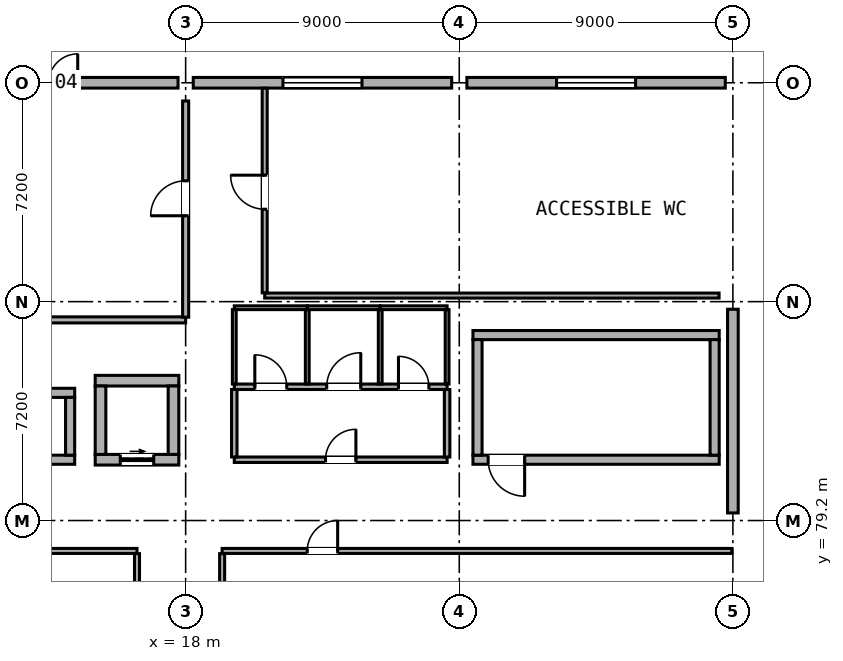
"""IFC4 building model, lengths in metres.
Left out: names, types, materials, properties, quantities, classifications, styles, units other than length and angle.
Written with IfcOpenShell. Run it as: python <this file> out.ifc"""

import sys

from ifc_helpers import new_model, si_unit, direction, frame, frame_2d, origin, origin_2d, place, context, subcontext, project, spatial, rectangle, hollow_rectangle, extrude, element, fill, save


model = new_model("IFC4")
c1 = context("Model", 3, precision=1e-05, world=origin(), true_north=direction((0.0, 1.0)))
c2 = subcontext(c1, "Body", "Model", "MODEL_VIEW")
j1 = project(units=[si_unit("LENGTHUNIT", "METRE"), si_unit("PLANEANGLEUNIT", "RADIAN")], contexts=[c1])
p1 = place(None, origin())
s1 = spatial("IfcSite", under=j1, at=p1, CompositionType="ELEMENT")
p2 = place(p1, origin())
s2 = spatial("IfcBuilding", under=s1, at=p2, CompositionType="ELEMENT")
p3 = place(p2, origin())
s3 = spatial("IfcBuildingStorey", under=s2, at=p3, CompositionType="ELEMENT", Elevation=0.0)
for number, where, z_axis, x_axis in (
    (1, (18.0, 79.2, 0.0), (0.0, 0.0, 1.0), (1.0, 0.0, 0.0)),
    (2, (18.0, 86.4, 0.0), (0.0, 0.0, 1.0), (1.0, 0.0, 0.0)),
):
    element("IfcColumn", number, at=place(p3, frame(where, z_axis=z_axis, x_axis=x_axis)), inside=s3, PredefinedType="COLUMN", context=c2, shape_type="SweptSolid", body=[
        extrude(hollow_rectangle(XDim=0.65, YDim=0.65, WallThickness=0.025, at=origin_2d()), origin(), (0.0, 0.0, 1.0), 4.8),
    ])
p4 = place(p3, frame((18.0, 93.6, 0.0), z_axis=(0.0, 0.0, 1.0), x_axis=(1.0, 0.0, 0.0)))
e3 = element("IfcColumn", 3, at=p4, inside=s3, PredefinedType="COLUMN", context=c2, shape_type="SweptSolid", body=[
    extrude(hollow_rectangle(XDim=0.5, YDim=0.5, WallThickness=0.022, at=origin_2d()), origin(), (0.0, 0.0, 1.0), 4.8),
])
for number, where, z_axis, x_axis in (
    (4, (27.0, 79.2, 0.0), (0.0, 0.0, 1.0), (1.0, 0.0, 0.0)),
    (5, (27.0, 86.4, 0.0), (0.0, 0.0, 1.0), (1.0, 0.0, 0.0)),
):
    element("IfcColumn", number, at=place(p3, frame(where, z_axis=z_axis, x_axis=x_axis)), inside=s3, PredefinedType="COLUMN", context=c2, shape_type="SweptSolid", body=[
        extrude(hollow_rectangle(XDim=0.65, YDim=0.65, WallThickness=0.025, at=origin_2d()), origin(), (0.0, 0.0, 1.0), 4.8),
    ])
for number, where, z_axis, x_axis in (
    (6, (27.0, 93.6, 0.0), (0.0, 0.0, 1.0), (1.0, 0.0, 0.0)),
    (7, (36.0, 79.2, 0.0), (0.0, 0.0, 1.0), (1.0, 0.0, 0.0)),
    (8, (36.0, 86.4, 0.0), (0.0, 0.0, 1.0), (1.0, 0.0, 0.0)),
    (9, (36.0, 93.6, 0.0), (0.0, 0.0, 1.0), (1.0, 0.0, 0.0)),
):
    element("IfcColumn", number, at=place(p3, frame(where, z_axis=z_axis, x_axis=x_axis)), inside=s3, PredefinedType="COLUMN", context=c2, shape_type="SweptSolid", body=[
        extrude(hollow_rectangle(XDim=0.5, YDim=0.5, WallThickness=0.022, at=origin_2d()), origin(), (0.0, 0.0, 1.0), 4.8),
    ])
p5 = place(p3, frame((17.75, 93.6, 0.0), z_axis=(0.0, 0.0, 1.0), x_axis=(-1.0, 0.0, 0.0)))
e10 = element("IfcWall", 10, at=p5, inside=s3, PredefinedType="STANDARD", context=c2, shape_type="SweptSolid", body=[
    extrude(rectangle(XDim=8.5, YDim=0.35, at=frame_2d((4.25, 0.0))), origin(), (0.0, 0.0, 1.0), 4.055),
])
p6 = place(p5, frame((3.3, 0.0, 0.0)))
e11 = element("IfcOpeningElement", 11, at=p6, cuts=e10, PredefinedType="OPENING", context=c2, shape_type="SweptSolid", body=[
    extrude(rectangle(XDim=1.9, YDim=2.4, at=frame_2d((0.95, 1.2))), frame((0.0, 0.187, 0.0), z_axis=(0.0, -1.0, 0.0), x_axis=(1.0, 0.0, 0.0)), (0.0, 0.0, 1.0), 0.374),
])
p7 = place(p3, frame((26.75, 93.6, 0.0), z_axis=(0.0, 0.0, 1.0), x_axis=(-1.0, 0.0, 0.0)))
e12 = element("IfcWall", 12, at=p7, inside=s3, PredefinedType="STANDARD", context=c2, shape_type="SweptSolid", body=[
    extrude(rectangle(XDim=8.5, YDim=0.35, at=frame_2d((4.25, 0.0))), origin(), (0.0, 0.0, 1.0), 4.055),
])
p8 = place(p7, frame((2.95, 0.0, 0.85)))
e13 = element("IfcOpeningElement", 13, at=p8, cuts=e12, PredefinedType="OPENING", context=c2, shape_type="SweptSolid", body=[
    extrude(rectangle(XDim=2.6, YDim=1.6, at=frame_2d((1.3, 0.8))), frame((0.0, 0.187, 0.0), z_axis=(0.0, -1.0, 0.0), x_axis=(1.0, 0.0, 0.0)), (0.0, 0.0, 1.0), 0.374),
])
p9 = place(p3, frame((35.75, 93.6, 0.0), z_axis=(0.0, 0.0, 1.0), x_axis=(-1.0, 0.0, 0.0)))
e14 = element("IfcWall", 14, at=p9, inside=s3, PredefinedType="STANDARD", context=c2, shape_type="SweptSolid", body=[
    extrude(rectangle(XDim=8.5, YDim=0.35, at=frame_2d((4.25, 0.0))), origin(), (0.0, 0.0, 1.0), 4.055),
])
p10 = place(p9, frame((2.95, 0.0, 0.85)))
e15 = element("IfcOpeningElement", 15, at=p10, cuts=e14, PredefinedType="OPENING", context=c2, shape_type="SweptSolid", body=[
    extrude(rectangle(XDim=2.6, YDim=1.6, at=frame_2d((1.3, 0.8))), frame((0.0, 0.187, 0.0), z_axis=(0.0, -1.0, 0.0), x_axis=(1.0, 0.0, 0.0)), (0.0, 0.0, 1.0), 0.374),
])
p11 = place(p3, frame((36.0, 86.15, 0.0), z_axis=(0.0, 0.0, 1.0), x_axis=(0.0, -1.0, 0.0)))
e16 = element("IfcWall", 16, at=p11, inside=s3, PredefinedType="STANDARD", context=c2, shape_type="SweptSolid", body=[
    extrude(rectangle(XDim=6.7, YDim=0.35, at=frame_2d((3.35, 0.0))), origin(), (0.0, 0.0, 1.0), 4.055),
])
p12 = place(p3, frame((27.45, 81.2, 0.0), z_axis=(0.0, 0.0, 1.0), x_axis=(1.0, 0.0, 0.0)))
e17 = element("IfcWall", 17, at=p12, inside=s3, PredefinedType="SHEAR", context=c2, shape_type="SweptSolid", body=[
    extrude(rectangle(XDim=8.1, YDim=0.3, at=frame_2d((4.05, 0.0))), origin(), (0.0, 0.0, 1.0), 4.555),
])
p13 = place(p12, frame((0.5, 0.0, 0.0)))
e18 = element("IfcOpeningElement", 18, at=p13, cuts=e17, PredefinedType="OPENING", context=c2, shape_type="SweptSolid", body=[
    extrude(rectangle(XDim=1.2, YDim=2.1, at=frame_2d((0.6, 1.05))), frame((0.0, 0.162, 0.0), z_axis=(0.0, -1.0, 0.0), x_axis=(1.0, 0.0, 0.0)), (0.0, 0.0, 1.0), 0.324),
])
p14 = place(p3, frame((27.45, 85.3, 0.0), z_axis=(0.0, 0.0, 1.0), x_axis=(1.0, 0.0, 0.0)))
e19 = element("IfcWall", 19, at=p14, inside=s3, PredefinedType="SHEAR", context=c2, shape_type="SweptSolid", body=[
    extrude(rectangle(XDim=8.1, YDim=0.3, at=frame_2d((4.05, 0.0))), origin(), (0.0, 0.0, 1.0), 4.555),
])
for number, where, z_axis, x_axis in (
    (20, (27.6, 81.35, 0.0), (0.0, 0.0, 1.0), (0.0, 1.0, 0.0)),
    (21, (35.4, 81.35, 0.0), (0.0, 0.0, 1.0), (0.0, 1.0, 0.0)),
):
    element("IfcWall", number, at=place(p3, frame(where, z_axis=z_axis, x_axis=x_axis)), inside=s3, PredefinedType="SHEAR", context=c2, shape_type="SweptSolid", body=[
        extrude(rectangle(XDim=3.8, YDim=0.3, at=frame_2d((1.9, 0.0))), origin(), (0.0, 0.0, 1.0), 4.555),
    ])
p15 = place(p3, frame((15.025, 81.2, 0.0), z_axis=(0.0, 0.0, 1.0), x_axis=(1.0, 0.0, 0.0)))
e22 = element("IfcWall", 22, at=p15, inside=s3, PredefinedType="SHEAR", context=c2, shape_type="SweptSolid", body=[
    extrude(rectangle(XDim=2.75, YDim=0.35, at=frame_2d((1.375, 0.0))), origin(), (0.0, 0.0, 1.0), 4.555),
])
p16 = place(p15, frame((0.825, 0.0, 0.0)))
e23 = element("IfcOpeningElement", 23, at=p16, cuts=e22, PredefinedType="OPENING", context=c2, shape_type="SweptSolid", body=[
    extrude(rectangle(XDim=1.1, YDim=2.1, at=frame_2d((0.55, 1.05))), frame((0.0, 0.187, 0.0), z_axis=(0.0, -1.0, 0.0), x_axis=(1.0, 0.0, 0.0)), (0.0, 0.0, 1.0), 0.374),
])
p17 = place(p3, frame((15.025, 83.8, 0.0), z_axis=(0.0, 0.0, 1.0), x_axis=(1.0, 0.0, 0.0)))
e24 = element("IfcWall", 24, at=p17, inside=s3, PredefinedType="SHEAR", context=c2, shape_type="SweptSolid", body=[
    extrude(rectangle(XDim=2.75, YDim=0.35, at=frame_2d((1.375, 0.0))), origin(), (0.0, 0.0, 1.0), 4.555),
])
for number, where, z_axis, x_axis in (
    (25, (15.2, 81.375, 0.0), (0.0, 0.0, 1.0), (0.0, 1.0, 0.0)),
    (26, (17.6, 81.375, 0.0), (0.0, 0.0, 1.0), (0.0, 1.0, 0.0)),
):
    element("IfcWall", number, at=place(p3, frame(where, z_axis=z_axis, x_axis=x_axis)), inside=s3, PredefinedType="SHEAR", context=c2, shape_type="SweptSolid", body=[
        extrude(rectangle(XDim=2.25, YDim=0.35, at=frame_2d((1.125, 0.0))), origin(), (0.0, 0.0, 1.0), 4.555),
    ])
for number, where, z_axis, x_axis in (
    (27, (12.05, 81.2, 0.0), (0.0, 0.0, 1.0), (1.0, 0.0, 0.0)),
    (28, (12.05, 83.4, 0.0), (0.0, 0.0, 1.0), (1.0, 0.0, 0.0)),
):
    element("IfcWall", number, at=place(p3, frame(where, z_axis=z_axis, x_axis=x_axis)), inside=s3, PredefinedType="SHEAR", context=c2, shape_type="SweptSolid", body=[
        extrude(rectangle(XDim=2.3, YDim=0.3, at=frame_2d((1.15, 0.0))), origin(), (0.0, 0.0, 1.0), 4.555),
    ])
p18 = place(p3, frame((14.2, 81.35, 0.0), z_axis=(0.0, 0.0, 1.0), x_axis=(0.0, 1.0, 0.0)))
e29 = element("IfcWall", 29, at=p18, inside=s3, PredefinedType="SHEAR", context=c2, shape_type="SweptSolid", body=[
    extrude(rectangle(XDim=1.9, YDim=0.3, at=frame_2d((0.95, 0.0))), origin(), (0.0, 0.0, 1.0), 4.555),
])
p19 = place(p3, frame((19.6, 81.2, 0.0), z_axis=(0.0, 0.0, 1.0), x_axis=(1.0, 0.0, 0.0)))
e30 = element("IfcWall", 30, at=p19, inside=s3, PredefinedType="PARTITIONING", context=c2, shape_type="SweptSolid", body=[
    extrude(rectangle(XDim=7.0, YDim=0.18, at=frame_2d((3.5, 0.0))), origin(), (0.0, 0.0, 1.0), 4.555),
])
p20 = place(p19, frame((3.0, 0.0, 0.0)))
e31 = element("IfcOpeningElement", 31, at=p20, cuts=e30, PredefinedType="OPENING", context=c2, shape_type="SweptSolid", body=[
    extrude(rectangle(XDim=1.0, YDim=2.08, at=frame_2d((0.5, 1.04))), frame((0.0, 0.102, 0.0), z_axis=(0.0, -1.0, 0.0), x_axis=(1.0, 0.0, 0.0)), (0.0, 0.0, 1.0), 0.204),
])
p21 = place(p3, frame((19.6, 83.6, 0.0), z_axis=(0.0, 0.0, 1.0), x_axis=(1.0, 0.0, 0.0)))
e32 = element("IfcWall", 32, at=p21, inside=s3, PredefinedType="PARTITIONING", context=c2, shape_type="SweptSolid", body=[
    extrude(rectangle(XDim=7.0, YDim=0.18, at=frame_2d((3.5, 0.0))), origin(), (0.0, 0.0, 1.0), 4.555),
])
p22 = place(p21, frame((0.675, 0.0, 0.0)))
e33 = element("IfcOpeningElement", 33, at=p22, cuts=e32, PredefinedType="OPENING", context=c2, shape_type="SweptSolid", body=[
    extrude(rectangle(XDim=1.05, YDim=2.1, at=frame_2d((0.525, 1.05))), frame((0.0, 0.102, 0.0), z_axis=(0.0, -1.0, 0.0), x_axis=(1.0, 0.0, 0.0)), (0.0, 0.0, 1.0), 0.204),
])
p23 = place(p21, frame((3.04, 0.0, 0.0)))
e34 = element("IfcOpeningElement", 34, at=p23, cuts=e32, PredefinedType="OPENING", context=c2, shape_type="SweptSolid", body=[
    extrude(rectangle(XDim=1.12, YDim=2.08, at=frame_2d((0.56, 1.04))), frame((0.0, 0.102, 0.0), z_axis=(0.0, -1.0, 0.0), x_axis=(1.0, 0.0, 0.0)), (0.0, 0.0, 1.0), 0.204),
])
p24 = place(p21, frame((5.4, 0.0, 0.0)))
e35 = element("IfcOpeningElement", 35, at=p24, cuts=e32, PredefinedType="OPENING", context=c2, shape_type="SweptSolid", body=[
    extrude(rectangle(XDim=1.0, YDim=2.08, at=frame_2d((0.5, 1.04))), frame((0.0, 0.102, 0.0), z_axis=(0.0, -1.0, 0.0), x_axis=(1.0, 0.0, 0.0)), (0.0, 0.0, 1.0), 0.204),
])
for number, where, z_axis, x_axis in (
    (36, (19.6, 81.29, 0.0), (0.0, 0.0, 1.0), (0.0, 1.0, 0.0)),
    (37, (26.6, 81.29, 0.0), (0.0, 0.0, 1.0), (0.0, 1.0, 0.0)),
):
    element("IfcWall", number, at=place(p3, frame(where, z_axis=z_axis, x_axis=x_axis)), inside=s3, PredefinedType="PARTITIONING", context=c2, shape_type="SweptSolid", body=[
        extrude(rectangle(XDim=2.22, YDim=0.18, at=frame_2d((1.11, 0.0))), origin(), (0.0, 0.0, 1.0), 4.555),
    ])
p25 = place(p3, frame((19.6, 86.2, 0.0), z_axis=(0.0, 0.0, 1.0), x_axis=(1.0, 0.0, 0.0)))
e38 = element("IfcWall", 38, at=p25, inside=s3, PredefinedType="PARTITIONING", context=c2, shape_type="SweptSolid", body=[
    extrude(rectangle(XDim=2.4, YDim=0.125, at=frame_2d((1.2, 0.0))), origin(), (0.0, 0.0, 1.0), 3.835),
])
for number, where, z_axis, x_axis in (
    (39, (19.6, 83.69, 0.0), (0.0, 0.0, 1.0), (0.0, 1.0, 0.0)),
    (40, (22.0, 83.69, 0.0), (0.0, 0.0, 1.0), (0.0, 1.0, 0.0)),
):
    element("IfcWall", number, at=place(p3, frame(where, z_axis=z_axis, x_axis=x_axis)), inside=s3, PredefinedType="PARTITIONING", context=c2, shape_type="SweptSolid", body=[
        extrude(rectangle(XDim=2.448, YDim=0.125, at=frame_2d((1.224, 0.0))), origin(), (0.0, 0.0, 1.0), 4.555),
    ])
p26 = place(p3, frame((22.0, 86.2, 0.0), z_axis=(0.0, 0.0, 1.0), x_axis=(1.0, 0.0, 0.0)))
e41 = element("IfcWall", 41, at=p26, inside=s3, PredefinedType="PARTITIONING", context=c2, shape_type="SweptSolid", body=[
    extrude(rectangle(XDim=2.4, YDim=0.125, at=frame_2d((1.2, 0.0))), origin(), (0.0, 0.0, 1.0), 3.835),
])
p27 = place(p3, frame((24.4, 83.69, 0.0), z_axis=(0.0, 0.0, 1.0), x_axis=(0.0, 1.0, 0.0)))
e42 = element("IfcWall", 42, at=p27, inside=s3, PredefinedType="PARTITIONING", context=c2, shape_type="SweptSolid", body=[
    extrude(rectangle(XDim=2.448, YDim=0.125, at=frame_2d((1.224, 0.0))), origin(), (0.0, 0.0, 1.0), 4.555),
])
p28 = place(p3, frame((24.4, 86.2, 0.0), z_axis=(0.0, 0.0, 1.0), x_axis=(1.0, 0.0, 0.0)))
e43 = element("IfcWall", 43, at=p28, inside=s3, PredefinedType="PARTITIONING", context=c2, shape_type="SweptSolid", body=[
    extrude(rectangle(XDim=2.2, YDim=0.125, at=frame_2d((1.1, 0.0))), origin(), (0.0, 0.0, 1.0), 3.835),
])
p29 = place(p3, frame((26.6, 83.69, 0.0), z_axis=(0.0, 0.0, 1.0), x_axis=(0.0, 1.0, 0.0)))
e44 = element("IfcWall", 44, at=p29, inside=s3, PredefinedType="PARTITIONING", context=c2, shape_type="SweptSolid", body=[
    extrude(rectangle(XDim=2.448, YDim=0.125, at=frame_2d((1.224, 0.0))), origin(), (0.0, 0.0, 1.0), 4.555),
])
p30 = place(p3, frame((0.18, 78.2, 0.0), z_axis=(0.0, 0.0, 1.0), x_axis=(1.0, 0.0, 0.0)))
e45 = element("IfcWall", 45, at=p30, inside=s3, PredefinedType="PARTITIONING", context=c2, shape_type="SweptSolid", body=[
    extrude(rectangle(XDim=16.22, YDim=0.165, at=frame_2d((8.11, 0.0))), origin(), (0.0, 0.0, 1.0), 4.555),
])
p31 = place(p30, frame((3.47, 0.0, 0.0)))
e46 = element("IfcOpeningElement", 46, at=p31, cuts=e45, PredefinedType="OPENING", context=c2, shape_type="SweptSolid", body=[
    extrude(rectangle(XDim=1.7, YDim=2.12, at=frame_2d((0.85, 1.06))), frame((0.0, 0.094, 0.0), z_axis=(0.0, -1.0, 0.0), x_axis=(1.0, 0.0, 0.0)), (0.0, 0.0, 1.0), 0.189),
])
p32 = place(p3, frame((16.4, 57.635, 0.0), z_axis=(0.0, 0.0, 1.0), x_axis=(0.0, 1.0, 0.0)))
e47 = element("IfcWall", 47, at=p32, inside=s3, PredefinedType="PARTITIONING", context=c2, shape_type="SweptSolid", body=[
    extrude(rectangle(XDim=20.475, YDim=0.165, at=frame_2d((10.238, 0.0))), origin(), (0.0, 0.0, 1.0), 4.555),
])
p33 = place(p3, frame((19.2, 78.2, 0.0), z_axis=(0.0, 0.0, 1.0), x_axis=(1.0, 0.0, 0.0)))
e48 = element("IfcWall", 48, at=p33, inside=s3, PredefinedType="PARTITIONING", context=c2, shape_type="SweptSolid", body=[
    extrude(rectangle(XDim=16.765, YDim=0.165, at=frame_2d((8.383, 0.0))), origin(), (0.0, 0.0, 1.0), 4.555),
])
p34 = place(p33, frame((2.8, 0.0, 0.0)))
e49 = element("IfcOpeningElement", 49, at=p34, cuts=e48, PredefinedType="OPENING", context=c2, shape_type="SweptSolid", body=[
    extrude(rectangle(XDim=1.0, YDim=2.08, at=frame_2d((0.5, 1.04))), frame((0.0, 0.094, 0.0), z_axis=(0.0, -1.0, 0.0), x_axis=(1.0, 0.0, 0.0)), (0.0, 0.0, 1.0), 0.189),
])
p35 = place(p3, frame((19.2, 68.89, 0.0), z_axis=(0.0, 0.0, 1.0), x_axis=(0.0, 1.0, 0.0)))
e50 = element("IfcWall", 50, at=p35, inside=s3, PredefinedType="PARTITIONING", context=c2, shape_type="SweptSolid", body=[
    extrude(rectangle(XDim=9.22, YDim=0.165, at=frame_2d((4.61, 0.0))), origin(), (0.0, 0.0, 1.0), 4.555),
])
p36 = place(p3, frame((0.18, 85.8, 0.0), z_axis=(0.0, 0.0, 1.0), x_axis=(1.0, 0.0, 0.0)))
e51 = element("IfcWall", 51, at=p36, inside=s3, PredefinedType="PARTITIONING", context=c2, shape_type="SweptSolid", body=[
    extrude(rectangle(XDim=17.82, YDim=0.2, at=frame_2d((8.91, 0.0))), origin(), (0.0, 0.0, 1.0), 4.555),
])
p37 = place(p3, frame((18.0, 85.89, 0.0), z_axis=(0.0, 0.0, 1.0), x_axis=(0.0, 1.0, 0.0)))
e52 = element("IfcWall", 52, at=p37, inside=s3, PredefinedType="PARTITIONING", context=c2, shape_type="SweptSolid", body=[
    extrude(rectangle(XDim=7.11, YDim=0.2, at=frame_2d((3.555, 0.0))), origin(), (0.0, 0.0, 1.0), 3.835),
])
p38 = place(p37, frame((3.335, 0.0, 0.0)))
e53 = element("IfcOpeningElement", 53, at=p38, cuts=e52, PredefinedType="OPENING", context=c2, shape_type="SweptSolid", body=[
    extrude(rectangle(XDim=1.15, YDim=2.1, at=frame_2d((0.575, 1.05))), frame((0.0, 0.112, 0.0), z_axis=(0.0, -1.0, 0.0), x_axis=(1.0, 0.0, 0.0)), (0.0, 0.0, 1.0), 0.224),
])
p39 = place(p3, frame((20.6, 86.6, 0.0), z_axis=(0.0, 0.0, 1.0), x_axis=(1.0, 0.0, 0.0)))
e54 = element("IfcWall", 54, at=p39, inside=s3, PredefinedType="PARTITIONING", context=c2, shape_type="SweptSolid", body=[
    extrude(rectangle(XDim=14.945, YDim=0.165, at=frame_2d((7.472, 0.0))), origin(), (0.0, 0.0, 1.0), 3.835),
])
p40 = place(p3, frame((20.6, 86.69, 0.0), z_axis=(0.0, 0.0, 1.0), x_axis=(0.0, 1.0, 0.0)))
e55 = element("IfcWall", 55, at=p40, inside=s3, PredefinedType="PARTITIONING", context=c2, shape_type="SweptSolid", body=[
    extrude(rectangle(XDim=6.73, YDim=0.165, at=frame_2d((3.365, 0.0))), origin(), (0.0, 0.0, 1.0), 4.555),
])
p41 = place(p40, frame((2.75, 0.0, 0.0)))
e56 = element("IfcOpeningElement", 56, at=p41, cuts=e55, PredefinedType="OPENING", context=c2, shape_type="SweptSolid", body=[
    extrude(rectangle(XDim=1.12, YDim=2.08, at=frame_2d((0.56, 1.04))), frame((0.0, 0.094, 0.0), z_axis=(0.0, -1.0, 0.0), x_axis=(1.0, 0.0, 0.0)), (0.0, 0.0, 1.0), 0.189),
])
p42 = place(p6, frame((1.9, 0.0, 0.0), z_axis=(0.0, 0.0, 1.0), x_axis=(-1.0, 0.0, 0.0)))
e57 = element("IfcDoor", 57, at=p42, inside=s3, OperationType="DOUBLE_DOOR_SINGLE_SWING", PredefinedType="DOOR", context=c2, shape_type="SweptSolid", body=[
    extrude(rectangle(XDim=1.9, YDim=2.4, at=frame_2d((0.95, 1.2))), frame((0.0, 0.025, 0.0), z_axis=(0.0, -1.0, 0.0), x_axis=(1.0, 0.0, 0.0)), (0.0, 0.0, 1.0), 0.05),
])
fill(e11, e57)
p43 = place(p8, origin())
e58 = element("IfcWindow", 58, at=p43, inside=s3, PartitioningType="DOUBLE_PANEL_VERTICAL", PredefinedType="WINDOW", context=c2, shape_type="SweptSolid", body=[
    extrude(rectangle(XDim=2.6, YDim=1.6, at=frame_2d((1.3, 0.8))), frame((0.0, 0.03, 0.0), z_axis=(0.0, -1.0, 0.0), x_axis=(1.0, 0.0, 0.0)), (0.0, 0.0, 1.0), 0.06),
])
fill(e13, e58)
p44 = place(p10, origin())
e59 = element("IfcWindow", 59, at=p44, inside=s3, PartitioningType="DOUBLE_PANEL_VERTICAL", PredefinedType="WINDOW", context=c2, shape_type="SweptSolid", body=[
    extrude(rectangle(XDim=2.6, YDim=1.6, at=frame_2d((1.3, 0.8))), frame((0.0, 0.03, 0.0), z_axis=(0.0, -1.0, 0.0), x_axis=(1.0, 0.0, 0.0)), (0.0, 0.0, 1.0), 0.06),
])
fill(e15, e59)
p45 = place(p13, frame((1.2, 0.0, 0.0), z_axis=(0.0, 0.0, 1.0), x_axis=(-1.0, 0.0, 0.0)))
e60 = element("IfcDoor", 60, at=p45, inside=s3, OperationType="SINGLE_SWING_LEFT", PredefinedType="DOOR", context=c2, shape_type="SweptSolid", body=[
    extrude(rectangle(XDim=1.2, YDim=2.1, at=frame_2d((0.6, 1.05))), frame((0.0, 0.025, 0.0), z_axis=(0.0, -1.0, 0.0), x_axis=(1.0, 0.0, 0.0)), (0.0, 0.0, 1.0), 0.05),
])
fill(e18, e60)
p46 = place(p16, origin())
e61 = element("IfcDoor", 61, at=p46, inside=s3, OperationType="SLIDING_TO_LEFT", PredefinedType="DOOR", context=c2, shape_type="SweptSolid", body=[
    extrude(rectangle(XDim=1.1, YDim=2.1, at=frame_2d((0.55, 1.05))), frame((0.0, 0.025, 0.0), z_axis=(0.0, -1.0, 0.0), x_axis=(1.0, 0.0, 0.0)), (0.0, 0.0, 1.0), 0.05),
])
fill(e23, e61)
p47 = place(p20, origin())
e62 = element("IfcDoor", 62, at=p47, inside=s3, OperationType="SINGLE_SWING_RIGHT", PredefinedType="DOOR", context=c2, shape_type="SweptSolid", body=[
    extrude(rectangle(XDim=1.0, YDim=2.08, at=frame_2d((0.5, 1.04))), frame((0.0, 0.025, 0.0), z_axis=(0.0, -1.0, 0.0), x_axis=(1.0, 0.0, 0.0)), (0.0, 0.0, 1.0), 0.05),
])
fill(e31, e62)
p48 = place(p22, origin())
e63 = element("IfcDoor", 63, at=p48, inside=s3, OperationType="SINGLE_SWING_LEFT", PredefinedType="DOOR", context=c2, shape_type="SweptSolid", body=[
    extrude(rectangle(XDim=1.05, YDim=2.1, at=frame_2d((0.525, 1.05))), frame((0.0, 0.025, 0.0), z_axis=(0.0, -1.0, 0.0), x_axis=(1.0, 0.0, 0.0)), (0.0, 0.0, 1.0), 0.05),
])
fill(e33, e63)
p49 = place(p23, origin())
e64 = element("IfcDoor", 64, at=p49, inside=s3, OperationType="SINGLE_SWING_RIGHT", PredefinedType="DOOR", context=c2, shape_type="SweptSolid", body=[
    extrude(rectangle(XDim=1.12, YDim=2.08, at=frame_2d((0.56, 1.04))), frame((0.0, 0.025, 0.0), z_axis=(0.0, -1.0, 0.0), x_axis=(1.0, 0.0, 0.0)), (0.0, 0.0, 1.0), 0.05),
])
fill(e34, e64)
p50 = place(p24, origin())
e65 = element("IfcDoor", 65, at=p50, inside=s3, OperationType="SINGLE_SWING_LEFT", PredefinedType="DOOR", context=c2, shape_type="SweptSolid", body=[
    extrude(rectangle(XDim=1.0, YDim=2.08, at=frame_2d((0.5, 1.04))), frame((0.0, 0.025, 0.0), z_axis=(0.0, -1.0, 0.0), x_axis=(1.0, 0.0, 0.0)), (0.0, 0.0, 1.0), 0.05),
])
fill(e35, e65)
p51 = place(p34, origin())
e66 = element("IfcDoor", 66, at=p51, inside=s3, OperationType="SINGLE_SWING_RIGHT", PredefinedType="DOOR", context=c2, shape_type="SweptSolid", body=[
    extrude(rectangle(XDim=1.0, YDim=2.08, at=frame_2d((0.5, 1.04))), frame((0.0, 0.025, 0.0), z_axis=(0.0, -1.0, 0.0), x_axis=(1.0, 0.0, 0.0)), (0.0, 0.0, 1.0), 0.05),
])
fill(e49, e66)
p52 = place(p38, origin())
e67 = element("IfcDoor", 67, at=p52, inside=s3, OperationType="SINGLE_SWING_LEFT", PredefinedType="DOOR", context=c2, shape_type="SweptSolid", body=[
    extrude(rectangle(XDim=1.15, YDim=2.1, at=frame_2d((0.575, 1.05))), frame((0.0, 0.025, 0.0), z_axis=(0.0, -1.0, 0.0), x_axis=(1.0, 0.0, 0.0)), (0.0, 0.0, 1.0), 0.05),
])
fill(e53, e67)
p53 = place(p41, origin())
e68 = element("IfcDoor", 68, at=p53, inside=s3, OperationType="SINGLE_SWING_RIGHT", PredefinedType="DOOR", context=c2, shape_type="SweptSolid", body=[
    extrude(rectangle(XDim=1.12, YDim=2.08, at=frame_2d((0.56, 1.04))), frame((0.0, 0.025, 0.0), z_axis=(0.0, -1.0, 0.0), x_axis=(1.0, 0.0, 0.0)), (0.0, 0.0, 1.0), 0.05),
])
fill(e56, e68)
save(model, sys.argv[1])
